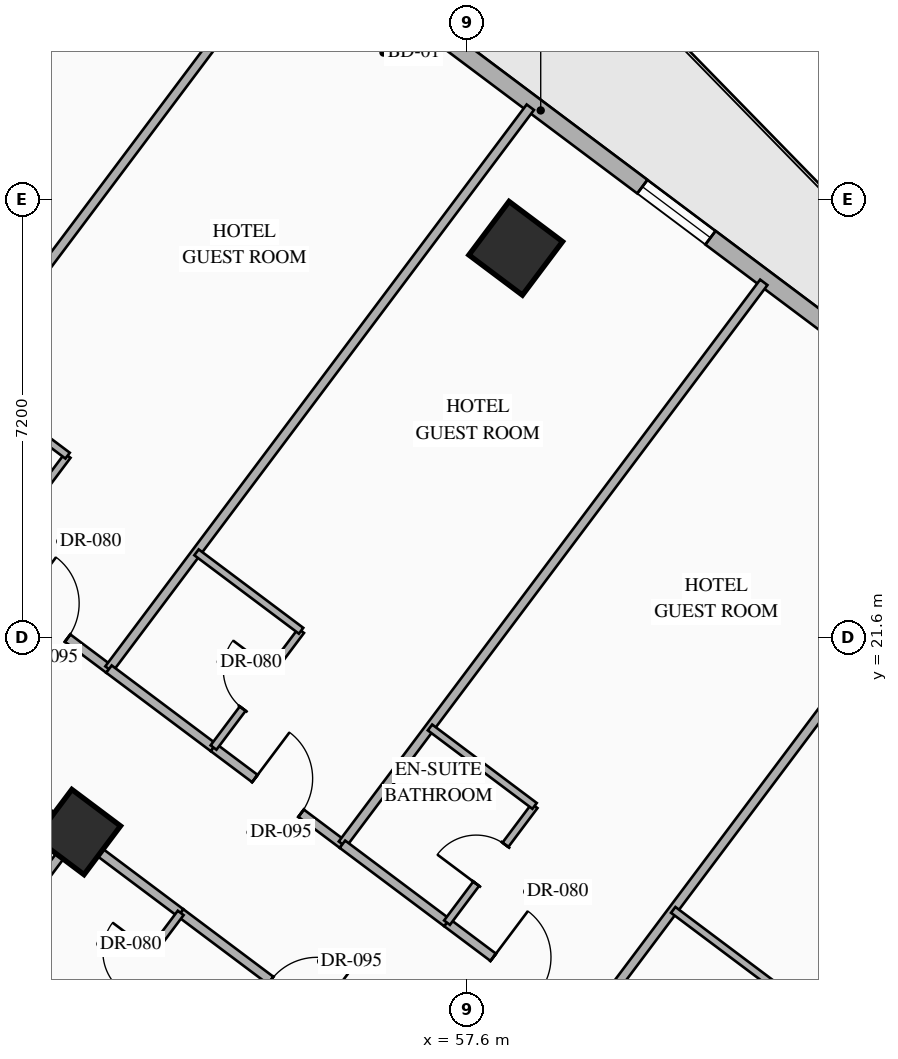
"""IFC4 building model, lengths in metres.
Left out: names, types, materials, properties, quantities, classifications, styles, units other than length and angle.
Written with IfcOpenShell. Run it as: python <this file> out.ifc"""

import sys

from ifc_helpers import new_model, si_unit, direction, frame, frame_2d, origin, origin_2d, place, context, subcontext, project, spatial, rectangle, hollow_rectangle, extrude, element, fill, save


model = new_model("IFC4")
c1 = context("Model", 3, precision=1e-05, world=origin(), true_north=direction((0.0, 1.0)))
c2 = subcontext(c1, "Body", "Model", "MODEL_VIEW")
j1 = project(units=[si_unit("LENGTHUNIT", "METRE"), si_unit("PLANEANGLEUNIT", "RADIAN")], contexts=[c1])
p1 = place(None, origin())
s1 = spatial("IfcSite", under=j1, at=p1, CompositionType="ELEMENT")
p2 = place(p1, origin())
s2 = spatial("IfcBuilding", under=s1, at=p2, CompositionType="ELEMENT")
p3 = place(p2, frame((0.0, 0.0, 50.0)))
s3 = spatial("IfcBuildingStorey", under=s2, at=p3, CompositionType="ELEMENT", Elevation=50.0)
p4 = place(p3, frame((58.4, 28.0, 0.0), z_axis=(0.0, 0.0, 1.0), x_axis=(0.799999996291, -0.600000004945, 0.0)))
e1 = element("IfcColumn", 1, at=p4, inside=s3, PredefinedType="COLUMN", context=c2, shape_type="SweptSolid", body=[
    extrude(hollow_rectangle(XDim=1.1, YDim=1.1, WallThickness=0.04, at=origin_2d()), origin(), (0.0, 0.0, 1.0), 3.35),
])
p5 = place(p3, frame((51.2, 18.4, 0.0), z_axis=(0.0, 0.0, 1.0), x_axis=(0.799999996291, -0.600000004945, 0.0)))
e2 = element("IfcColumn", 2, at=p5, inside=s3, PredefinedType="COLUMN", context=c2, shape_type="SweptSolid", body=[
    extrude(hollow_rectangle(XDim=1.0, YDim=1.0, WallThickness=0.038, at=origin_2d()), origin(), (0.0, 0.0, 1.0), 3.35),
])
p6 = place(p3, frame((44.86, 40.73, 0.0), z_axis=(0.0, 0.0, 1.0), x_axis=(0.800006902154, -0.599990797017, 0.0)))
e3 = element("IfcWall", 3, at=p6, inside=s3, PredefinedType="STANDARD", context=c2, shape_type="SweptSolid", body=[
    extrude(rectangle(XDim=29.712, YDim=0.28, at=frame_2d((14.856, 0.0))), origin(), (0.0, 0.0, 1.0), 3.13),
])
p7 = place(p6, frame((14.249, 0.0, 0.0)))
e4 = element("IfcOpeningElement", 4, at=p7, cuts=e3, PredefinedType="OPENING", context=c2, shape_type="SweptSolid", body=[
    extrude(rectangle(XDim=1.1, YDim=2.2, at=frame_2d((0.55, 1.1))), frame((0.0, 0.15, 0.0), z_axis=(0.0, -1.0, 0.0), x_axis=(1.0, 0.0, 0.0)), (0.0, 0.0, 1.0), 0.3),
])
p8 = place(p6, frame((1.612, 0.0, 0.85)))
e5 = element("IfcOpeningElement", 5, at=p8, cuts=e3, PredefinedType="OPENING", context=c2, shape_type="SweptSolid", body=[
    extrude(rectangle(XDim=1.4, YDim=1.8, at=frame_2d((0.7, 0.9))), frame((0.0, 0.15, 0.0), z_axis=(0.0, -1.0, 0.0), x_axis=(1.0, 0.0, 0.0)), (0.0, 0.0, 1.0), 0.3),
])
p9 = place(p6, frame((5.667, 0.0, 0.85)))
e6 = element("IfcOpeningElement", 6, at=p9, cuts=e3, PredefinedType="OPENING", context=c2, shape_type="SweptSolid", body=[
    extrude(rectangle(XDim=1.4, YDim=1.8, at=frame_2d((0.7, 0.9))), frame((0.0, 0.15, 0.0), z_axis=(0.0, -1.0, 0.0), x_axis=(1.0, 0.0, 0.0)), (0.0, 0.0, 1.0), 0.3),
])
p10 = place(p6, frame((9.912, 0.0, 0.85)))
e7 = element("IfcOpeningElement", 7, at=p10, cuts=e3, PredefinedType="OPENING", context=c2, shape_type="SweptSolid", body=[
    extrude(rectangle(XDim=1.4, YDim=1.8, at=frame_2d((0.7, 0.9))), frame((0.0, 0.15, 0.0), z_axis=(0.0, -1.0, 0.0), x_axis=(1.0, 0.0, 0.0)), (0.0, 0.0, 1.0), 0.3),
])
p11 = place(p6, frame((19.528, 0.0, 0.85)))
e8 = element("IfcOpeningElement", 8, at=p11, cuts=e3, PredefinedType="OPENING", context=c2, shape_type="SweptSolid", body=[
    extrude(rectangle(XDim=1.4, YDim=1.8, at=frame_2d((0.7, 0.9))), frame((0.0, 0.15, 0.0), z_axis=(0.0, -1.0, 0.0), x_axis=(1.0, 0.0, 0.0)), (0.0, 0.0, 1.0), 0.3),
])
p12 = place(p6, frame((23.451, 0.0, 0.85)))
e9 = element("IfcOpeningElement", 9, at=p12, cuts=e3, PredefinedType="OPENING", context=c2, shape_type="SweptSolid", body=[
    extrude(rectangle(XDim=1.4, YDim=1.8, at=frame_2d((0.7, 0.9))), frame((0.0, 0.15, 0.0), z_axis=(0.0, -1.0, 0.0), x_axis=(1.0, 0.0, 0.0)), (0.0, 0.0, 1.0), 0.3),
])
p13 = place(p6, frame((27.852, 0.0, 0.85)))
e10 = element("IfcOpeningElement", 10, at=p13, cuts=e3, PredefinedType="OPENING", context=c2, shape_type="SweptSolid", body=[
    extrude(rectangle(XDim=1.4, YDim=1.8, at=frame_2d((0.7, 0.9))), frame((0.0, 0.15, 0.0), z_axis=(0.0, -1.0, 0.0), x_axis=(1.0, 0.0, 0.0)), (0.0, 0.0, 1.0), 0.3),
])
p14 = place(p3, frame((53.318, 2.487, 0.0), z_axis=(0.0, 0.0, 1.0), x_axis=(-0.800004174678, 0.599994433723, 0.0)))
e11 = element("IfcWall", 11, at=p14, inside=s3, PredefinedType="STANDARD", context=c2, shape_type="SweptSolid", body=[
    extrude(rectangle(XDim=35.089, YDim=0.28, at=frame_2d((17.544, 0.0))), origin(), (0.0, 0.0, 1.0), 3.13),
])
p15 = place(p14, frame((1.931, 0.0, 0.85)))
e12 = element("IfcOpeningElement", 12, at=p15, cuts=e11, PredefinedType="OPENING", context=c2, shape_type="SweptSolid", body=[
    extrude(rectangle(XDim=1.4, YDim=1.8, at=frame_2d((0.7, 0.9))), frame((0.0, 0.15, 0.0), z_axis=(0.0, -1.0, 0.0), x_axis=(1.0, 0.0, 0.0)), (0.0, 0.0, 1.0), 0.3),
])
p16 = place(p14, frame((6.819, 0.0, 0.85)))
e13 = element("IfcOpeningElement", 13, at=p16, cuts=e11, PredefinedType="OPENING", context=c2, shape_type="SweptSolid", body=[
    extrude(rectangle(XDim=1.4, YDim=1.8, at=frame_2d((0.7, 0.9))), frame((0.0, 0.15, 0.0), z_axis=(0.0, -1.0, 0.0), x_axis=(1.0, 0.0, 0.0)), (0.0, 0.0, 1.0), 0.3),
])
p17 = place(p14, frame((11.832, 0.0, 0.85)))
e14 = element("IfcOpeningElement", 14, at=p17, cuts=e11, PredefinedType="OPENING", context=c2, shape_type="SweptSolid", body=[
    extrude(rectangle(XDim=1.4, YDim=1.8, at=frame_2d((0.7, 0.9))), frame((0.0, 0.15, 0.0), z_axis=(0.0, -1.0, 0.0), x_axis=(1.0, 0.0, 0.0)), (0.0, 0.0, 1.0), 0.3),
])
p18 = place(p14, frame((17.647, 0.0, 0.85)))
e15 = element("IfcOpeningElement", 15, at=p18, cuts=e11, PredefinedType="OPENING", context=c2, shape_type="SweptSolid", body=[
    extrude(rectangle(XDim=1.4, YDim=1.8, at=frame_2d((0.7, 0.9))), frame((0.0, 0.15, 0.0), z_axis=(0.0, -1.0, 0.0), x_axis=(1.0, 0.0, 0.0)), (0.0, 0.0, 1.0), 0.3),
])
p19 = place(p14, frame((21.857, 0.0, 0.85)))
e16 = element("IfcOpeningElement", 16, at=p19, cuts=e11, PredefinedType="OPENING", context=c2, shape_type="SweptSolid", body=[
    extrude(rectangle(XDim=1.4, YDim=1.8, at=frame_2d((0.7, 0.9))), frame((0.0, 0.15, 0.0), z_axis=(0.0, -1.0, 0.0), x_axis=(1.0, 0.0, 0.0)), (0.0, 0.0, 1.0), 0.3),
])
p20 = place(p14, frame((26.87, 0.0, 0.85)))
e17 = element("IfcOpeningElement", 17, at=p20, cuts=e11, PredefinedType="OPENING", context=c2, shape_type="SweptSolid", body=[
    extrude(rectangle(XDim=1.4, YDim=1.8, at=frame_2d((0.7, 0.9))), frame((0.0, 0.15, 0.0), z_axis=(0.0, -1.0, 0.0), x_axis=(1.0, 0.0, 0.0)), (0.0, 0.0, 1.0), 0.3),
])
p21 = place(p14, frame((31.757, 0.0, 0.85)))
e18 = element("IfcOpeningElement", 18, at=p21, cuts=e11, PredefinedType="OPENING", context=c2, shape_type="SweptSolid", body=[
    extrude(rectangle(XDim=1.4, YDim=1.8, at=frame_2d((0.7, 0.9))), frame((0.0, 0.15, 0.0), z_axis=(0.0, -1.0, 0.0), x_axis=(1.0, 0.0, 0.0)), (0.0, 0.0, 1.0), 0.3),
])
p22 = place(p3, frame((49.59, 22.67, 0.0), z_axis=(0.0, 0.0, 1.0), x_axis=(0.800011056104, -0.599985258246, 0.0)))
e19 = element("IfcWall", 19, at=p22, inside=s3, PredefinedType="PARTITIONING", context=c2, shape_type="SweptSolid", body=[
    extrude(rectangle(XDim=2.65, YDim=0.15, at=frame_2d((1.325, 0.0))), origin(), (0.0, 0.0, 1.0), 2.775),
])
p23 = place(p22, frame((0.85, 0.0, 0.0)))
e20 = element("IfcOpeningElement", 20, at=p23, cuts=e19, PredefinedType="OPENING", context=c2, shape_type="SweptSolid", body=[
    extrude(rectangle(XDim=0.95, YDim=2.15, at=frame_2d((0.475, 1.075))), frame((0.0, 0.085, 0.0), z_axis=(0.0, -1.0, 0.0), x_axis=(1.0, 0.0, 0.0)), (0.0, 0.0, 1.0), 0.17),
])
p24 = place(p3, frame((49.59, 22.67, 0.0), z_axis=(0.0, 0.0, 1.0), x_axis=(0.599951172744, 0.800036618114, 0.0)))
e21 = element("IfcWall", 21, at=p24, inside=s3, PredefinedType="PARTITIONING", context=c2, shape_type="SweptSolid", body=[
    extrude(rectangle(XDim=2.4, YDim=0.12, at=frame_2d((1.2, 0.0))), origin(), (0.0, 0.0, 1.0), 3.13),
])
p25 = place(p24, frame((0.8, 0.0, 0.0)))
e22 = element("IfcOpeningElement", 22, at=p25, cuts=e21, PredefinedType="OPENING", context=c2, shape_type="SweptSolid", body=[
    extrude(rectangle(XDim=0.8, YDim=2.06, at=frame_2d((0.4, 1.03))), frame((0.0, 0.07, 0.0), z_axis=(0.0, -1.0, 0.0), x_axis=(1.0, 0.0, 0.0)), (0.0, 0.0, 1.0), 0.14),
])
p26 = place(p3, frame((49.31, 25.88, 0.0), z_axis=(0.0, 0.0, 1.0), x_axis=(0.800040880289, -0.59994548908, 0.0)))
e23 = element("IfcWall", 23, at=p26, inside=s3, PredefinedType="PARTITIONING", context=c2, shape_type="SweptSolid", body=[
    extrude(rectangle(XDim=2.15, YDim=0.12, at=frame_2d((1.075, 0.0))), origin(), (0.0, 0.0, 1.0), 3.13),
])
for number, where, z_axis, x_axis in (
    (24, (47.87, 23.96, 0.0), (0.0, 0.0, 1.0), (0.6, 0.8, 0.0)),
    (25, (51.71, 21.08, 0.0), (0.0, 0.0, 1.0), (0.6, 0.8, 0.0)),
):
    element("IfcWall", number, at=place(p3, frame(where, z_axis=z_axis, x_axis=x_axis)), inside=s3, PredefinedType="PARTITIONING", context=c2, shape_type="SweptSolid", body=[
        extrude(rectangle(XDim=11.55, YDim=0.15, at=frame_2d((5.775, 0.0))), origin(), (0.0, 0.0, 1.0), 3.13),
    ])
p27 = place(p3, frame((51.71, 21.08, 0.0), z_axis=(0.0, 0.0, 1.0), x_axis=(0.79998637334, -0.60001816845, 0.0)))
e26 = element("IfcWall", 26, at=p27, inside=s3, PredefinedType="PARTITIONING", context=c2, shape_type="SweptSolid", body=[
    extrude(rectangle(XDim=2.15, YDim=0.15, at=frame_2d((1.075, 0.0))), origin(), (0.0, 0.0, 1.0), 2.775),
])
p28 = place(p3, frame((53.43, 19.79, 0.0), z_axis=(0.0, 0.0, 1.0), x_axis=(0.8, -0.6, 0.0)))
e27 = element("IfcWall", 27, at=p28, inside=s3, PredefinedType="PARTITIONING", context=c2, shape_type="SweptSolid", body=[
    extrude(rectangle(XDim=2.65, YDim=0.15, at=frame_2d((1.325, 0.0))), origin(), (0.0, 0.0, 1.0), 2.775),
])
p29 = place(p28, frame((0.85, 0.0, 0.0)))
e28 = element("IfcOpeningElement", 28, at=p29, cuts=e27, PredefinedType="OPENING", context=c2, shape_type="SweptSolid", body=[
    extrude(rectangle(XDim=0.95, YDim=2.15, at=frame_2d((0.475, 1.075))), frame((0.0, 0.085, 0.0), z_axis=(0.0, -1.0, 0.0), x_axis=(1.0, 0.0, 0.0)), (0.0, 0.0, 1.0), 0.17),
])
p30 = place(p3, frame((53.43, 19.79, 0.0), z_axis=(0.0, 0.0, 1.0), x_axis=(0.600065100855, 0.79995117022, 0.0)))
e29 = element("IfcWall", 29, at=p30, inside=s3, PredefinedType="PARTITIONING", context=c2, shape_type="SweptSolid", body=[
    extrude(rectangle(XDim=2.4, YDim=0.12, at=frame_2d((1.2, 0.0))), origin(), (0.0, 0.0, 1.0), 3.13),
])
p31 = place(p30, frame((0.8, 0.0, 0.0)))
e30 = element("IfcOpeningElement", 30, at=p31, cuts=e29, PredefinedType="OPENING", context=c2, shape_type="SweptSolid", body=[
    extrude(rectangle(XDim=0.8, YDim=2.06, at=frame_2d((0.4, 1.03))), frame((0.0, 0.07, 0.0), z_axis=(0.0, -1.0, 0.0), x_axis=(1.0, 0.0, 0.0)), (0.0, 0.0, 1.0), 0.14),
])
p32 = place(p3, frame((53.15, 23.0, 0.0), z_axis=(0.0, 0.0, 1.0), x_axis=(0.800027249606, -0.599963665473, 0.0)))
e31 = element("IfcWall", 31, at=p32, inside=s3, PredefinedType="PARTITIONING", context=c2, shape_type="SweptSolid", body=[
    extrude(rectangle(XDim=2.15, YDim=0.12, at=frame_2d((1.075, 0.0))), origin(), (0.0, 0.0, 1.0), 3.13),
])
p33 = place(p3, frame((55.55, 18.2, 0.0), z_axis=(0.0, 0.0, 1.0), x_axis=(0.599996617946, 0.80000253653, 0.0)))
e32 = element("IfcWall", 32, at=p33, inside=s3, PredefinedType="PARTITIONING", context=c2, shape_type="SweptSolid", body=[
    extrude(rectangle(XDim=11.55, YDim=0.15, at=frame_2d((5.775, 0.0))), origin(), (0.0, 0.0, 1.0), 3.13),
])
p34 = place(p3, frame((55.55, 18.2, 0.0), z_axis=(0.0, 0.0, 1.0), x_axis=(0.79998637334, -0.60001816845, 0.0)))
e33 = element("IfcWall", 33, at=p34, inside=s3, PredefinedType="PARTITIONING", context=c2, shape_type="SweptSolid", body=[
    extrude(rectangle(XDim=2.15, YDim=0.15, at=frame_2d((1.075, 0.0))), origin(), (0.0, 0.0, 1.0), 2.775),
])
p35 = place(p3, frame((57.27, 16.91, 0.0), z_axis=(0.0, 0.0, 1.0), x_axis=(0.800010279488, -0.599986293772, 0.0)))
e34 = element("IfcWall", 34, at=p35, inside=s3, PredefinedType="PARTITIONING", context=c2, shape_type="SweptSolid", body=[
    extrude(rectangle(XDim=2.85, YDim=0.15, at=frame_2d((1.425, 0.0))), origin(), (0.0, 0.0, 1.0), 2.775),
])
p36 = place(p35, frame((0.95, 0.0, 0.0)))
e35 = element("IfcOpeningElement", 35, at=p36, cuts=e34, PredefinedType="OPENING", context=c2, shape_type="SweptSolid", body=[
    extrude(rectangle(XDim=0.95, YDim=2.15, at=frame_2d((0.475, 1.075))), frame((0.0, 0.085, 0.0), z_axis=(0.0, -1.0, 0.0), x_axis=(1.0, 0.0, 0.0)), (0.0, 0.0, 1.0), 0.17),
])
p37 = place(p3, frame((57.27, 16.91, 0.0), z_axis=(0.0, 0.0, 1.0), x_axis=(0.599951172744, 0.800036618114, 0.0)))
e36 = element("IfcWall", 36, at=p37, inside=s3, PredefinedType="PARTITIONING", context=c2, shape_type="SweptSolid", body=[
    extrude(rectangle(XDim=2.4, YDim=0.12, at=frame_2d((1.2, 0.0))), origin(), (0.0, 0.0, 1.0), 3.13),
])
p38 = place(p37, frame((0.8, 0.0, 0.0)))
e37 = element("IfcOpeningElement", 37, at=p38, cuts=e36, PredefinedType="OPENING", context=c2, shape_type="SweptSolid", body=[
    extrude(rectangle(XDim=0.8, YDim=2.06, at=frame_2d((0.4, 1.03))), frame((0.0, 0.07, 0.0), z_axis=(0.0, -1.0, 0.0), x_axis=(1.0, 0.0, 0.0)), (0.0, 0.0, 1.0), 0.14),
])
p39 = place(p3, frame((56.99, 20.12, 0.0), z_axis=(0.0, 0.0, 1.0), x_axis=(0.79998637334, -0.60001816845, 0.0)))
e38 = element("IfcWall", 38, at=p39, inside=s3, PredefinedType="PARTITIONING", context=c2, shape_type="SweptSolid", body=[
    extrude(rectangle(XDim=2.15, YDim=0.12, at=frame_2d((1.075, 0.0))), origin(), (0.0, 0.0, 1.0), 3.13),
])
p40 = place(p3, frame((59.55, 15.2, 0.0), z_axis=(0.0, 0.0, 1.0), x_axis=(0.599996617946, 0.80000253653, 0.0)))
e39 = element("IfcWall", 39, at=p40, inside=s3, PredefinedType="PARTITIONING", context=c2, shape_type="SweptSolid", body=[
    extrude(rectangle(XDim=11.55, YDim=0.15, at=frame_2d((5.775, 0.0))), origin(), (0.0, 0.0, 1.0), 3.13),
])
p41 = place(p3, frame((60.99, 17.12, 0.0), z_axis=(0.0, 0.0, 1.0), x_axis=(0.79998637334, -0.60001816845, 0.0)))
e40 = element("IfcWall", 40, at=p41, inside=s3, PredefinedType="PARTITIONING", context=c2, shape_type="SweptSolid", body=[
    extrude(rectangle(XDim=2.15, YDim=0.12, at=frame_2d((1.075, 0.0))), origin(), (0.0, 0.0, 1.0), 3.13),
])
p42 = place(p3, frame((49.45, 19.65, 0.0), z_axis=(0.0, 0.0, 1.0), x_axis=(0.800040880289, -0.59994548908, 0.0)))
e41 = element("IfcWall", 41, at=p42, inside=s3, PredefinedType="PARTITIONING", context=c2, shape_type="SweptSolid", body=[
    extrude(rectangle(XDim=2.15, YDim=0.15, at=frame_2d((1.075, 0.0))), origin(), (0.0, 0.0, 1.0), 2.425),
])
p43 = place(p3, frame((44.36, 9.28, 0.0), z_axis=(0.0, 0.0, 1.0), x_axis=(0.599986233332, 0.800010324816, 0.0)))
e42 = element("IfcWall", 42, at=p43, inside=s3, PredefinedType="PARTITIONING", context=c2, shape_type="SweptSolid", body=[
    extrude(rectangle(XDim=11.35, YDim=0.15, at=frame_2d((5.675, 0.0))), origin(), (0.0, 0.0, 1.0), 2.425),
])
p44 = place(p3, frame((51.17, 18.36, 0.0), z_axis=(0.0, 0.0, 1.0), x_axis=(0.79998637334, -0.60001816845, 0.0)))
e43 = element("IfcWall", 43, at=p44, inside=s3, PredefinedType="PARTITIONING", context=c2, shape_type="SweptSolid", body=[
    extrude(rectangle(XDim=2.15, YDim=0.15, at=frame_2d((1.075, 0.0))), origin(), (0.0, 0.0, 1.0), 2.425),
])
p45 = place(p3, frame((52.89, 17.07, 0.0), z_axis=(0.0, 0.0, 1.0), x_axis=(0.800012600101, -0.599983199498, 0.0)))
e44 = element("IfcWall", 44, at=p45, inside=s3, PredefinedType="PARTITIONING", context=c2, shape_type="SweptSolid", body=[
    extrude(rectangle(XDim=4.65, YDim=0.15, at=frame_2d((2.325, 0.0))), origin(), (0.0, 0.0, 1.0), 2.425),
])
p46 = place(p45, frame((1.85, 0.0, 0.0)))
e45 = element("IfcOpeningElement", 45, at=p46, cuts=e44, PredefinedType="OPENING", context=c2, shape_type="SweptSolid", body=[
    extrude(rectangle(XDim=0.95, YDim=2.15, at=frame_2d((0.475, 1.075))), frame((0.0, 0.085, 0.0), z_axis=(0.0, -1.0, 0.0), x_axis=(1.0, 0.0, 0.0)), (0.0, 0.0, 1.0), 0.17),
])
p47 = place(p3, frame((51.45, 15.15, 0.0), z_axis=(0.0, 0.0, 1.0), x_axis=(0.599951172744, 0.800036618114, 0.0)))
e46 = element("IfcWall", 46, at=p47, inside=s3, PredefinedType="PARTITIONING", context=c2, shape_type="SweptSolid", body=[
    extrude(rectangle(XDim=2.4, YDim=0.12, at=frame_2d((1.2, 0.0))), origin(), (0.0, 0.0, 1.0), 3.13),
])
p48 = place(p47, frame((0.8, 0.0, 0.0)))
e47 = element("IfcOpeningElement", 47, at=p48, cuts=e46, PredefinedType="OPENING", context=c2, shape_type="SweptSolid", body=[
    extrude(rectangle(XDim=0.8, YDim=2.06, at=frame_2d((0.4, 1.03))), frame((0.0, 0.07, 0.0), z_axis=(0.0, -1.0, 0.0), x_axis=(1.0, 0.0, 0.0)), (0.0, 0.0, 1.0), 0.14),
])
p49 = place(p3, frame((49.73, 16.44, 0.0), z_axis=(0.0, 0.0, 1.0), x_axis=(0.79998637334, -0.60001816845, 0.0)))
e48 = element("IfcWall", 48, at=p49, inside=s3, PredefinedType="PARTITIONING", context=c2, shape_type="SweptSolid", body=[
    extrude(rectangle(XDim=2.15, YDim=0.12, at=frame_2d((1.075, 0.0))), origin(), (0.0, 0.0, 1.0), 3.13),
])
p50 = place(p11, origin())
e49 = element("IfcWindow", 49, at=p50, inside=s3, PartitioningType="SINGLE_PANEL", PredefinedType="WINDOW", context=c2, shape_type="SweptSolid", body=[
    extrude(rectangle(XDim=1.4, YDim=1.8, at=frame_2d((0.7, 0.9))), frame((0.0, 0.03, 0.0), z_axis=(0.0, -1.0, 0.0), x_axis=(1.0, 0.0, 0.0)), (0.0, 0.0, 1.0), 0.06),
])
fill(e8, e49)
p51 = place(p23, origin())
e50 = element("IfcDoor", 50, at=p51, inside=s3, OperationType="SINGLE_SWING_LEFT", PredefinedType="DOOR", context=c2, shape_type="SweptSolid", body=[
    extrude(rectangle(XDim=0.95, YDim=2.15, at=frame_2d((0.475, 1.075))), frame((0.0, 0.025, 0.0), z_axis=(0.0, -1.0, 0.0), x_axis=(1.0, 0.0, 0.0)), (0.0, 0.0, 1.0), 0.05),
])
fill(e20, e50)
p52 = place(p29, origin())
e51 = element("IfcDoor", 51, at=p52, inside=s3, OperationType="SINGLE_SWING_LEFT", PredefinedType="DOOR", context=c2, shape_type="SweptSolid", body=[
    extrude(rectangle(XDim=0.95, YDim=2.15, at=frame_2d((0.475, 1.075))), frame((0.0, 0.025, 0.0), z_axis=(0.0, -1.0, 0.0), x_axis=(1.0, 0.0, 0.0)), (0.0, 0.0, 1.0), 0.05),
])
fill(e28, e51)
p53 = place(p31, origin())
e52 = element("IfcDoor", 52, at=p53, inside=s3, OperationType="SINGLE_SWING_RIGHT", PredefinedType="DOOR", context=c2, shape_type="SweptSolid", body=[
    extrude(rectangle(XDim=0.8, YDim=2.06, at=frame_2d((0.4, 1.03))), frame((0.0, 0.025, 0.0), z_axis=(0.0, -1.0, 0.0), x_axis=(1.0, 0.0, 0.0)), (0.0, 0.0, 1.0), 0.05),
])
fill(e30, e52)
p54 = place(p36, origin())
e53 = element("IfcDoor", 53, at=p54, inside=s3, OperationType="SINGLE_SWING_LEFT", PredefinedType="DOOR", context=c2, shape_type="SweptSolid", body=[
    extrude(rectangle(XDim=0.95, YDim=2.15, at=frame_2d((0.475, 1.075))), frame((0.0, 0.025, 0.0), z_axis=(0.0, -1.0, 0.0), x_axis=(1.0, 0.0, 0.0)), (0.0, 0.0, 1.0), 0.05),
])
fill(e35, e53)
p55 = place(p38, origin())
e54 = element("IfcDoor", 54, at=p55, inside=s3, OperationType="SINGLE_SWING_LEFT", PredefinedType="DOOR", context=c2, shape_type="SweptSolid", body=[
    extrude(rectangle(XDim=0.8, YDim=2.06, at=frame_2d((0.4, 1.03))), frame((0.0, 0.025, 0.0), z_axis=(0.0, -1.0, 0.0), x_axis=(1.0, 0.0, 0.0)), (0.0, 0.0, 1.0), 0.05),
])
fill(e37, e54)
p56 = place(p48, origin())
e55 = element("IfcDoor", 55, at=p56, inside=s3, OperationType="SINGLE_SWING_RIGHT", PredefinedType="DOOR", context=c2, shape_type="SweptSolid", body=[
    extrude(rectangle(XDim=0.8, YDim=2.06, at=frame_2d((0.4, 1.03))), frame((0.0, 0.025, 0.0), z_axis=(0.0, -1.0, 0.0), x_axis=(1.0, 0.0, 0.0)), (0.0, 0.0, 1.0), 0.05),
])
fill(e47, e55)
save(model, sys.argv[1])
